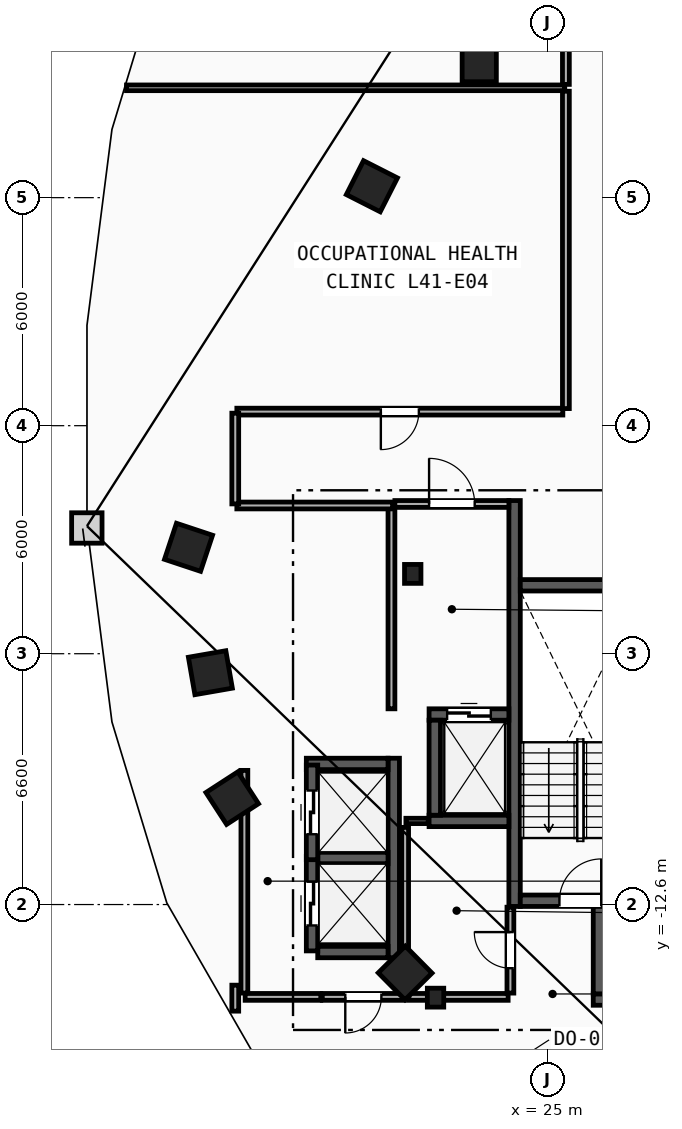
"""IFC4 building model, lengths in metres.
Left out: names, types, materials, properties, quantities, classifications, styles, units other than length and angle.
Written with IfcOpenShell. Run it as: python <this file> out.ifc"""

import sys

from ifc_helpers import new_model, si_unit, direction, frame, frame_2d, origin, origin_2d, place, context, subcontext, project, spatial, rectangle, i_section, extrude, element, fill, save


model = new_model("IFC4")
c1 = context("Model", 3, precision=1e-05, world=origin(), true_north=direction((0.0, 1.0)))
c2 = subcontext(c1, "Body", "Model", "MODEL_VIEW")
j1 = project(units=[si_unit("LENGTHUNIT", "METRE"), si_unit("PLANEANGLEUNIT", "RADIAN")], contexts=[c1])
p1 = place(None, origin())
s1 = spatial("IfcSite", under=j1, at=p1, CompositionType="ELEMENT")
p2 = place(p1, origin())
s2 = spatial("IfcBuilding", under=s1, at=p2, CompositionType="ELEMENT")
p3 = place(p2, frame((0.0, 0.0, 158.4)))
s3 = spatial("IfcBuildingStorey", under=s2, at=p3, CompositionType="ELEMENT", Elevation=158.4)
for number, where, z_axis, x_axis in (
    (1, (21.45, -3.9, 0.0), (0.0, 0.0, 1.0), (1.0, 0.0, 0.0)),
    (2, (22.05, -15.05, 0.0), (0.0, 0.0, 1.0), (1.0, 0.0, 0.0)),
):
    element("IfcColumn", number, at=place(p3, frame(where, z_axis=z_axis, x_axis=x_axis)), inside=s3, PredefinedType="COLUMN", context=c2, shape_type="SweptSolid", body=[
        extrude(i_section(OverallWidth=0.432, OverallDepth=0.498, WebThickness=0.056, FlangeThickness=0.089, FilletRadius=0.018, at=origin_2d()), origin(), (0.0, 0.0, 1.0), 3.6),
    ])
p4 = place(p3, frame((23.2, 9.5, 0.0), z_axis=(0.0, 0.0, 1.0), x_axis=(1.0, 0.0, 0.0)))
e3 = element("IfcColumn", 3, at=p4, inside=s3, PredefinedType="COLUMN", context=c2, shape_type="SweptSolid", body=[
    extrude(rectangle(XDim=0.9, YDim=0.9, at=origin_2d()), origin(), (0.0, 0.0, 1.0), 3.6),
])
for number, where, z_axis, x_axis in (
    (4, (15.55, -3.2, 0.0), (0.0, 0.0, 1.0), (-0.315, -0.949, 0.0)),
    (5, (16.125, -6.5, 0.0), (0.0, 0.0, 1.0), (0.172, -0.985, 0.0)),
    (6, (16.7, -9.8, 0.0), (0.0, 0.0, 1.0), (0.544, -0.839, 0.0)),
    (7, (21.25, -14.4, 0.0), (0.0, 0.0, 1.0), (0.703, -0.711, 0.0)),
    (8, (20.375, 6.3, 0.0), (0.0, 0.0, 1.0), (-0.453, -0.892, 0.0)),
):
    element("IfcColumn", number, at=place(p3, frame(where, z_axis=z_axis, x_axis=x_axis)), inside=s3, PredefinedType="COLUMN", context=c2, shape_type="SweptSolid", body=[
        extrude(rectangle(XDim=1.0, YDim=1.0, at=origin_2d()), origin(), (0.0, 0.0, 1.0), 3.6),
    ])
p5 = place(p3, frame((24.13, -12.65, 0.0), z_axis=(0.0, 0.0, 1.0), x_axis=(0.0, 1.0, 0.0)))
e9 = element("IfcWall", 9, at=p5, inside=s3, PredefinedType="SHEAR", context=c2, shape_type="SweptSolid", body=[
    extrude(rectangle(XDim=10.68, YDim=0.3, at=frame_2d((5.34, 0.0))), origin(), (0.0, 0.0, 1.0), 3.36),
])
p6 = place(p3, frame((24.28, -12.5, 0.0), z_axis=(0.0, 0.0, 1.0), x_axis=(1.0, 0.0, 0.0)))
e10 = element("IfcWall", 10, at=p6, inside=s3, PredefinedType="SHEAR", context=c2, shape_type="SweptSolid", body=[
    extrude(rectangle(XDim=3.16, YDim=0.3, at=frame_2d((1.58, 0.0))), origin(), (0.0, 0.0, 1.0), 3.36),
])
p7 = place(p6, frame((1.03, 0.0, 0.0)))
e11 = element("IfcOpeningElement", 11, at=p7, cuts=e10, PredefinedType="OPENING", context=c2, shape_type="SweptSolid", body=[
    extrude(rectangle(XDim=1.1, YDim=2.15, at=frame_2d((0.55, 1.075))), frame((0.0, 0.16, 0.0), z_axis=(0.0, -1.0, 0.0), x_axis=(1.0, 0.0, 0.0)), (0.0, 0.0, 1.0), 0.32),
])
p8 = place(p3, frame((24.28, -4.2, 0.0), z_axis=(0.0, 0.0, 1.0), x_axis=(1.0, 0.0, 0.0)))
e12 = element("IfcWall", 12, at=p8, inside=s3, PredefinedType="SHEAR", context=c2, shape_type="SweptSolid", body=[
    extrude(rectangle(XDim=3.16, YDim=0.3, at=frame_2d((1.58, 0.0))), origin(), (0.0, 0.0, 1.0), 3.36),
])
p9 = place(p3, frame((20.89, -7.45, 0.0), z_axis=(0.0, 0.0, 1.0), x_axis=(0.0, 1.0, 0.0)))
e13 = element("IfcWall", 13, at=p9, inside=s3, PredefinedType="PARTITIONING", context=c2, shape_type="SweptSolid", body=[
    extrude(rectangle(XDim=5.3, YDim=0.18, at=frame_2d((2.65, 0.0))), origin(), (0.0, 0.0, 1.0), 3.36),
])
p10 = place(p3, frame((20.98, -2.06, 0.0), z_axis=(0.0, 0.0, 1.0), x_axis=(1.0, 0.0, 0.0)))
e14 = element("IfcWall", 14, at=p10, inside=s3, PredefinedType="PARTITIONING", context=c2, shape_type="SweptSolid", body=[
    extrude(rectangle(XDim=3.0, YDim=0.18, at=frame_2d((1.5, 0.0))), origin(), (0.0, 0.0, 1.0), 3.36),
])
p11 = place(p10, frame((0.9, 0.0, 0.0)))
e15 = element("IfcOpeningElement", 15, at=p11, cuts=e14, PredefinedType="OPENING", context=c2, shape_type="SweptSolid", body=[
    extrude(rectangle(XDim=1.2, YDim=2.15, at=frame_2d((0.6, 1.075))), frame((0.0, 0.1, 0.0), z_axis=(0.0, -1.0, 0.0), x_axis=(1.0, 0.0, 0.0)), (0.0, 0.0, 1.0), 0.2),
])
p12 = place(p3, frame((21.88, -7.6, 0.0), z_axis=(0.0, 0.0, 1.0), x_axis=(1.0, 0.0, 0.0)))
e16 = element("IfcWall", 16, at=p12, inside=s3, PredefinedType="SHEAR", context=c2, shape_type="SweptSolid", body=[
    extrude(rectangle(XDim=2.1, YDim=0.3, at=frame_2d((1.05, 0.0))), origin(), (0.0, 0.0, 1.0), 3.36),
])
p13 = place(p12, frame((0.475, 0.0, 0.0)))
e17 = element("IfcOpeningElement", 17, at=p13, cuts=e16, PredefinedType="OPENING", context=c2, shape_type="SweptSolid", body=[
    extrude(rectangle(XDim=1.15, YDim=2.2, at=frame_2d((0.575, 1.1))), frame((0.0, 0.16, 0.0), z_axis=(0.0, -1.0, 0.0), x_axis=(1.0, 0.0, 0.0)), (0.0, 0.0, 1.0), 0.32),
])
p14 = place(p3, frame((21.88, -10.4, 0.0), z_axis=(0.0, 0.0, 1.0), x_axis=(1.0, 0.0, 0.0)))
e18 = element("IfcWall", 18, at=p14, inside=s3, PredefinedType="SHEAR", context=c2, shape_type="SweptSolid", body=[
    extrude(rectangle(XDim=2.1, YDim=0.3, at=frame_2d((1.05, 0.0))), origin(), (0.0, 0.0, 1.0), 3.36),
])
for number, where, z_axis, x_axis in (
    (19, (22.03, -10.25, 0.0), (0.0, 0.0, 1.0), (0.0, 1.0, 0.0)),
    (20, (26.2, -15.1, 0.0), (0.0, 0.0, 1.0), (1.0, 0.0, 0.0)),
):
    element("IfcWall", number, at=place(p3, frame(where, z_axis=z_axis, x_axis=x_axis)), inside=s3, PredefinedType="SHEAR", context=c2, shape_type="SweptSolid", body=[
        extrude(rectangle(XDim=2.5, YDim=0.3, at=frame_2d((1.25, 0.0))), origin(), (0.0, 0.0, 1.0), 3.36),
    ])
p15 = place(p3, frame((26.35, -14.95, 0.0), z_axis=(0.0, 0.0, 1.0), x_axis=(0.0, 1.0, 0.0)))
e21 = element("IfcWall", 21, at=p15, inside=s3, PredefinedType="SHEAR", context=c2, shape_type="SweptSolid", body=[
    extrude(rectangle(XDim=2.3, YDim=0.3, at=frame_2d((1.15, 0.0))), origin(), (0.0, 0.0, 1.0), 3.36),
])
p16 = place(p3, frame((20.95, -14.0, 0.0), z_axis=(0.0, 0.0, 1.0), x_axis=(0.0, 1.0, 0.0)))
e22 = element("IfcWall", 22, at=p16, inside=s3, PredefinedType="SHEAR", context=c2, shape_type="SweptSolid", body=[
    extrude(rectangle(XDim=5.25, YDim=0.3, at=frame_2d((2.625, 0.0))), origin(), (0.0, 0.0, 1.0), 3.36),
])
p17 = place(p3, frame((18.95, -13.85, 0.0), z_axis=(0.0, 0.0, 1.0), x_axis=(1.0, 0.0, 0.0)))
e23 = element("IfcWall", 23, at=p17, inside=s3, PredefinedType="SHEAR", context=c2, shape_type="SweptSolid", body=[
    extrude(rectangle(XDim=1.85, YDim=0.3, at=frame_2d((0.925, 0.0))), origin(), (0.0, 0.0, 1.0), 3.36),
])
p18 = place(p3, frame((18.65, -8.9, 0.0), z_axis=(0.0, 0.0, 1.0), x_axis=(1.0, 0.0, 0.0)))
e24 = element("IfcWall", 24, at=p18, inside=s3, PredefinedType="SHEAR", context=c2, shape_type="SweptSolid", body=[
    extrude(rectangle(XDim=2.15, YDim=0.3, at=frame_2d((1.075, 0.0))), origin(), (0.0, 0.0, 1.0), 3.36),
])
p19 = place(p3, frame((18.95, -11.375, 0.0), z_axis=(0.0, 0.0, 1.0), x_axis=(1.0, 0.0, 0.0)))
e25 = element("IfcWall", 25, at=p19, inside=s3, PredefinedType="SHEAR", context=c2, shape_type="SweptSolid", body=[
    extrude(rectangle(XDim=1.85, YDim=0.3, at=frame_2d((0.925, 0.0))), origin(), (0.0, 0.0, 1.0), 3.36),
])
p20 = place(p3, frame((18.8, -13.82, 0.0), z_axis=(0.0, 0.0, 1.0), x_axis=(0.0, 1.0, 0.0)))
e26 = element("IfcWall", 26, at=p20, inside=s3, PredefinedType="SHEAR", context=c2, shape_type="SweptSolid", body=[
    extrude(rectangle(XDim=2.49, YDim=0.3, at=frame_2d((1.245, 0.0))), origin(), (0.0, 0.0, 1.0), 3.36),
])
p21 = place(p20, frame((0.67, 0.0, 0.0)))
e27 = element("IfcOpeningElement", 27, at=p21, cuts=e26, PredefinedType="OPENING", context=c2, shape_type="SweptSolid", body=[
    extrude(rectangle(XDim=1.15, YDim=2.2, at=frame_2d((0.575, 1.1))), frame((0.0, 0.16, 0.0), z_axis=(0.0, -1.0, 0.0), x_axis=(1.0, 0.0, 0.0)), (0.0, 0.0, 1.0), 0.32),
])
p22 = place(p3, frame((18.8, -11.42, 0.0), z_axis=(0.0, 0.0, 1.0), x_axis=(0.0, 1.0, 0.0)))
e28 = element("IfcWall", 28, at=p22, inside=s3, PredefinedType="SHEAR", context=c2, shape_type="SweptSolid", body=[
    extrude(rectangle(XDim=2.49, YDim=0.3, at=frame_2d((1.245, 0.0))), origin(), (0.0, 0.0, 1.0), 3.36),
])
p23 = place(p22, frame((0.67, 0.0, 0.0)))
e29 = element("IfcOpeningElement", 29, at=p23, cuts=e28, PredefinedType="OPENING", context=c2, shape_type="SweptSolid", body=[
    extrude(rectangle(XDim=1.15, YDim=2.2, at=frame_2d((0.575, 1.1))), frame((0.0, 0.16, 0.0), z_axis=(0.0, -1.0, 0.0), x_axis=(1.0, 0.0, 0.0)), (0.0, 0.0, 1.0), 0.32),
])
p24 = place(p3, frame((17.02, -14.93, 0.0), z_axis=(0.0, 0.0, 1.0), x_axis=(0.0, 1.0, 0.0)))
e30 = element("IfcWall", 30, at=p24, inside=s3, PredefinedType="PARTITIONING", context=c2, shape_type="SweptSolid", body=[
    extrude(rectangle(XDim=5.86, YDim=0.18, at=frame_2d((2.93, 0.0))), origin(), (0.0, 0.0, 1.0), 3.36),
])
p25 = place(p3, frame((17.04, -15.03, 0.0), z_axis=(0.0, 0.0, 1.0), x_axis=(1.0, 0.0, 0.0)))
e31 = element("IfcWall", 31, at=p25, inside=s3, PredefinedType="PARTITIONING", context=c2, shape_type="SweptSolid", body=[
    extrude(rectangle(XDim=1.99, YDim=0.18, at=frame_2d((0.995, 0.0))), origin(), (0.0, 0.0, 1.0), 3.36),
])
p26 = place(p3, frame((21.23, -15.03, 0.0), z_axis=(0.0, 0.0, 1.0), x_axis=(-1.0, 0.0, 0.0)))
e32 = element("IfcWall", 32, at=p26, inside=s3, PredefinedType="PARTITIONING", context=c2, shape_type="SweptSolid", body=[
    extrude(rectangle(XDim=2.16, YDim=0.18, at=frame_2d((1.08, 0.0))), origin(), (0.0, 0.0, 1.0), 3.36),
])
p27 = place(p26, frame((0.605, 0.0, 0.0)))
e33 = element("IfcOpeningElement", 33, at=p27, cuts=e32, PredefinedType="OPENING", context=c2, shape_type="SweptSolid", body=[
    extrude(rectangle(XDim=0.95, YDim=2.1, at=frame_2d((0.475, 1.05))), frame((0.0, 0.1, 0.0), z_axis=(0.0, -1.0, 0.0), x_axis=(1.0, 0.0, 0.0)), (0.0, 0.0, 1.0), 0.2),
])
p28 = place(p3, frame((21.27, -10.4, 0.0), z_axis=(0.0, 0.0, 1.0), x_axis=(1.0, 0.0, 0.0)))
e34 = element("IfcWall", 34, at=p28, inside=s3, PredefinedType="PARTITIONING", context=c2, shape_type="SweptSolid", body=[
    extrude(rectangle(XDim=0.59, YDim=0.14, at=frame_2d((0.295, 0.0))), origin(), (0.0, 0.0, 1.0), 3.36),
])
p29 = place(p3, frame((21.25, -14.93, 0.0), z_axis=(0.0, 0.0, 1.0), x_axis=(0.0, 1.0, 0.0)))
e35 = element("IfcWall", 35, at=p29, inside=s3, PredefinedType="PARTITIONING", context=c2, shape_type="SweptSolid", body=[
    extrude(rectangle(XDim=4.36, YDim=0.18, at=frame_2d((2.18, 0.0))), origin(), (0.0, 0.0, 1.0), 3.36),
])
p30 = place(p3, frame((21.35, -15.03, 0.0), z_axis=(0.0, 0.0, 1.0), x_axis=(1.0, 0.0, 0.0)))
e36 = element("IfcWall", 36, at=p30, inside=s3, PredefinedType="PARTITIONING", context=c2, shape_type="SweptSolid", body=[
    extrude(rectangle(XDim=2.61, YDim=0.18, at=frame_2d((1.305, 0.0))), origin(), (0.0, 0.0, 1.0), 2.433),
])
p31 = place(p3, frame((24.02, -14.93, 0.0), z_axis=(0.0, 0.0, 1.0), x_axis=(0.0, 1.0, 0.0)))
e37 = element("IfcWall", 37, at=p31, inside=s3, PredefinedType="PARTITIONING", context=c2, shape_type="SweptSolid", body=[
    extrude(rectangle(XDim=2.26, YDim=0.18, at=frame_2d((1.13, 0.0))), origin(), (0.0, 0.0, 1.0), 3.36),
])
p32 = place(p31, frame((0.655, 0.0, 0.0)))
e38 = element("IfcOpeningElement", 38, at=p32, cuts=e37, PredefinedType="OPENING", context=c2, shape_type="SweptSolid", body=[
    extrude(rectangle(XDim=0.95, YDim=2.1, at=frame_2d((0.475, 1.05))), frame((0.0, 0.1, 0.0), z_axis=(0.0, -1.0, 0.0), x_axis=(1.0, 0.0, 0.0)), (0.0, 0.0, 1.0), 0.2),
])
p33 = place(p3, frame((13.918, 8.89, 0.0), z_axis=(0.0, 0.0, 1.0), x_axis=(1.0, 0.0, 0.0)))
e39 = element("IfcWall", 39, at=p33, inside=s3, PredefinedType="PARTITIONING", context=c2, shape_type="SweptSolid", body=[
    extrude(rectangle(XDim=11.532, YDim=0.15, at=frame_2d((5.766, 0.0))), origin(), (0.0, 0.0, 1.0), 3.36),
])
p34 = place(p3, frame((25.4, 0.37, 0.0), z_axis=(0.0, 0.0, 1.0), x_axis=(-1.0, 0.0, 0.0)))
e40 = element("IfcWall", 40, at=p34, inside=s3, PredefinedType="PARTITIONING", context=c2, shape_type="SweptSolid", body=[
    extrude(rectangle(XDim=8.578, YDim=0.18, at=frame_2d((4.289, 0.0))), origin(), (0.0, 0.0, 1.0), 3.36),
])
p35 = place(p34, frame((3.789, 0.0, 0.0)))
e41 = element("IfcOpeningElement", 41, at=p35, cuts=e40, PredefinedType="OPENING", context=c2, shape_type="SweptSolid", body=[
    extrude(rectangle(XDim=1.0, YDim=2.15, at=frame_2d((0.5, 1.075))), frame((0.0, 0.1, 0.0), z_axis=(0.0, -1.0, 0.0), x_axis=(1.0, 0.0, 0.0)), (0.0, 0.0, 1.0), 0.2),
])
p36 = place(p3, frame((25.48, 8.8, 0.0), z_axis=(0.0, 0.0, 1.0), x_axis=(0.0, -1.0, 0.0)))
e42 = element("IfcWall", 42, at=p36, inside=s3, PredefinedType="PARTITIONING", context=c2, shape_type="SweptSolid", body=[
    extrude(rectangle(XDim=8.35, YDim=0.18, at=frame_2d((4.175, 0.0))), origin(), (0.0, 0.0, 1.0), 3.36),
])
p37 = place(p3, frame((16.822, -2.1, 0.0), z_axis=(0.0, 0.0, 1.0), x_axis=(1.0, 0.0, 0.0)))
e43 = element("IfcWall", 43, at=p37, inside=s3, PredefinedType="PARTITIONING", context=c2, shape_type="SweptSolid", body=[
    extrude(rectangle(XDim=4.098, YDim=0.18, at=frame_2d((2.049, 0.0))), origin(), (0.0, 0.0, 1.0), 3.36),
])
p38 = place(p3, frame((16.78, 0.329, 0.0), z_axis=(0.0, 0.0, 1.0), x_axis=(0.0, -1.0, 0.0)))
e44 = element("IfcWall", 44, at=p38, inside=s3, PredefinedType="PARTITIONING", context=c2, shape_type="SweptSolid", body=[
    extrude(rectangle(XDim=2.387, YDim=0.18, at=frame_2d((1.194, 0.0))), origin(), (0.0, 0.0, 1.0), 3.36),
])
p39 = place(p3, frame((16.78, -14.721, 0.0), z_axis=(0.0, 0.0, 1.0), x_axis=(0.0, -1.0, 0.0)))
e45 = element("IfcWall", 45, at=p39, inside=s3, PredefinedType="PARTITIONING", context=c2, shape_type="SweptSolid", body=[
    extrude(rectangle(XDim=0.684, YDim=0.18, at=frame_2d((0.342, 0.0))), origin(), (0.0, 0.0, 1.0), 3.36),
])
p40 = place(p3, frame((25.48, 11.178, 0.0), z_axis=(0.0, 0.0, 1.0), x_axis=(0.0, -1.0, 0.0)))
e46 = element("IfcWall", 46, at=p40, inside=s3, PredefinedType="PARTITIONING", context=c2, shape_type="SweptSolid", body=[
    extrude(rectangle(XDim=2.198, YDim=0.18, at=frame_2d((1.099, 0.0))), origin(), (0.0, 0.0, 1.0), 3.36),
])
p41 = place(p7, origin())
e47 = element("IfcDoor", 47, at=p41, inside=s3, OperationType="SINGLE_SWING_RIGHT", PredefinedType="DOOR", context=c2, shape_type="SweptSolid", body=[
    extrude(rectangle(XDim=1.1, YDim=2.15, at=frame_2d((0.55, 1.075))), frame((0.0, 0.025, 0.0), z_axis=(0.0, -1.0, 0.0), x_axis=(1.0, 0.0, 0.0)), (0.0, 0.0, 1.0), 0.05),
])
fill(e11, e47)
p42 = place(p11, origin())
e48 = element("IfcDoor", 48, at=p42, inside=s3, OperationType="SINGLE_SWING_LEFT", PredefinedType="DOOR", context=c2, shape_type="SweptSolid", body=[
    extrude(rectangle(XDim=1.2, YDim=2.15, at=frame_2d((0.6, 1.075))), frame((0.0, 0.025, 0.0), z_axis=(0.0, -1.0, 0.0), x_axis=(1.0, 0.0, 0.0)), (0.0, 0.0, 1.0), 0.05),
])
fill(e15, e48)
p43 = place(p13, origin())
e49 = element("IfcDoor", 49, at=p43, inside=s3, OperationType="SLIDING_TO_LEFT", PredefinedType="TRAPDOOR", context=c2, shape_type="SweptSolid", body=[
    extrude(rectangle(XDim=1.15, YDim=2.2, at=frame_2d((0.575, 1.1))), frame((0.0, 0.025, 0.0), z_axis=(0.0, -1.0, 0.0), x_axis=(1.0, 0.0, 0.0)), (0.0, 0.0, 1.0), 0.05),
])
fill(e17, e49)
p44 = place(p21, origin())
e50 = element("IfcDoor", 50, at=p44, inside=s3, OperationType="SLIDING_TO_LEFT", PredefinedType="TRAPDOOR", context=c2, shape_type="SweptSolid", body=[
    extrude(rectangle(XDim=1.15, YDim=2.2, at=frame_2d((0.575, 1.1))), frame((0.0, 0.025, 0.0), z_axis=(0.0, -1.0, 0.0), x_axis=(1.0, 0.0, 0.0)), (0.0, 0.0, 1.0), 0.05),
])
fill(e27, e50)
p45 = place(p23, origin())
e51 = element("IfcDoor", 51, at=p45, inside=s3, OperationType="SLIDING_TO_LEFT", PredefinedType="TRAPDOOR", context=c2, shape_type="SweptSolid", body=[
    extrude(rectangle(XDim=1.15, YDim=2.2, at=frame_2d((0.575, 1.1))), frame((0.0, 0.025, 0.0), z_axis=(0.0, -1.0, 0.0), x_axis=(1.0, 0.0, 0.0)), (0.0, 0.0, 1.0), 0.05),
])
fill(e29, e51)
p46 = place(p35, origin())
e52 = element("IfcDoor", 52, at=p46, inside=s3, OperationType="SINGLE_SWING_RIGHT", PredefinedType="DOOR", context=c2, shape_type="SweptSolid", body=[
    extrude(rectangle(XDim=1.0, YDim=2.15, at=frame_2d((0.5, 1.075))), frame((0.0, 0.025, 0.0), z_axis=(0.0, -1.0, 0.0), x_axis=(1.0, 0.0, 0.0)), (0.0, 0.0, 1.0), 0.05),
])
fill(e41, e52)
p47 = place(p32, origin())
e53 = element("IfcDoor", 53, at=p47, inside=s3, OperationType="SINGLE_SWING_RIGHT", PredefinedType="DOOR", context=c2, shape_type="SweptSolid", body=[
    extrude(rectangle(XDim=0.95, YDim=2.1, at=frame_2d((0.475, 1.05))), frame((0.0, 0.025, 0.0), z_axis=(0.0, -1.0, 0.0), x_axis=(1.0, 0.0, 0.0)), (0.0, 0.0, 1.0), 0.05),
])
fill(e38, e53)
p48 = place(p27, origin())
e54 = element("IfcDoor", 54, at=p48, inside=s3, OperationType="SINGLE_SWING_RIGHT", PredefinedType="DOOR", context=c2, shape_type="SweptSolid", body=[
    extrude(rectangle(XDim=0.95, YDim=2.1, at=frame_2d((0.475, 1.05))), frame((0.0, 0.025, 0.0), z_axis=(0.0, -1.0, 0.0), x_axis=(1.0, 0.0, 0.0)), (0.0, 0.0, 1.0), 0.05),
])
fill(e33, e54)
save(model, sys.argv[1])
